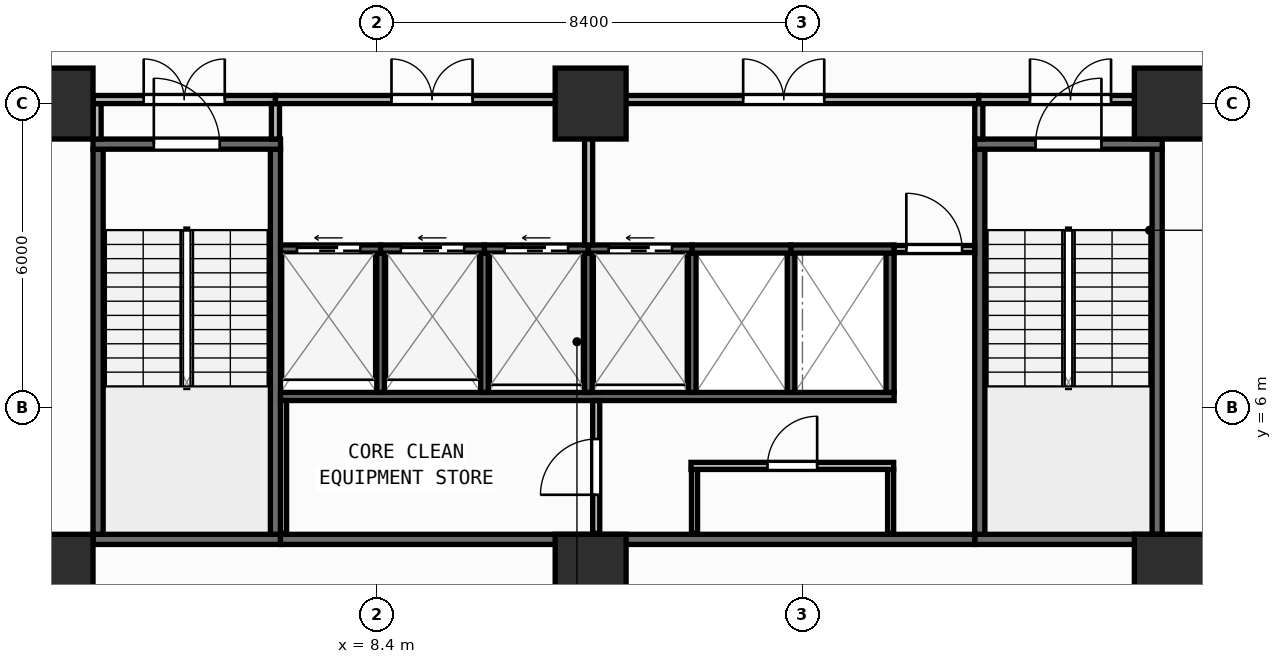
"""IFC4 building model, lengths in metres.
Left out: names, types, materials, properties, quantities, classifications, styles, units other than length and angle.
Written with IfcOpenShell. Run it as: python <this file> out.ifc"""

import sys

from ifc_helpers import new_model, si_unit, direction, frame, frame_2d, origin, origin_2d, place, context, subcontext, project, spatial, rectangle, extrude, element, fill, save


model = new_model("IFC4")
c1 = context("Model", 3, precision=1e-05, world=origin(), true_north=direction((0.0, 1.0)))
c2 = subcontext(c1, "Body", "Model", "MODEL_VIEW")
j1 = project(units=[si_unit("LENGTHUNIT", "METRE"), si_unit("PLANEANGLEUNIT", "RADIAN")], contexts=[c1])
p1 = place(None, origin())
s1 = spatial("IfcSite", under=j1, at=p1, CompositionType="ELEMENT")
p2 = place(p1, origin())
s2 = spatial("IfcBuilding", under=s1, at=p2, CompositionType="ELEMENT")
p3 = place(p2, frame((0.0, 0.0, 18.0)))
s3 = spatial("IfcBuildingStorey", under=s2, at=p3, CompositionType="ELEMENT", Elevation=18.0)
for number, where, z_axis, x_axis in (
    (1, (2.1, 2.8, 0.0), (0.0, 0.0, 1.0), (1.0, 0.0, 0.0)),
    (2, (12.62, 2.8, 0.0), (0.0, 0.0, 1.0), (1.0, 0.0, 0.0)),
    (3, (24.05, 2.8, 0.0), (0.0, 0.0, 1.0), (1.0, 0.0, 0.0)),
    (4, (2.1, 12.0, 0.0), (0.0, 0.0, 1.0), (1.0, 0.0, 0.0)),
    (5, (12.62, 12.0, 0.0), (0.0, 0.0, 1.0), (1.0, 0.0, 0.0)),
    (6, (24.05, 12.0, 0.0), (0.0, 0.0, 1.0), (1.0, 0.0, 0.0)),
):
    element("IfcColumn", number, at=place(p3, frame(where, z_axis=z_axis, x_axis=x_axis)), inside=s3, PredefinedType="COLUMN", context=c2, shape_type="SweptSolid", body=[
        extrude(rectangle(XDim=1.4, YDim=1.4, at=origin_2d()), origin(), (0.0, 0.0, 1.0), 4.5),
    ])
p4 = place(p3, frame((2.8, 3.4, 0.0), z_axis=(0.0, 0.0, 1.0), x_axis=(1.0, 0.0, 0.0)))
e7 = element("IfcWall", 7, at=p4, inside=s3, PredefinedType="SHEAR", context=c2, shape_type="SweptSolid", body=[
    extrude(rectangle(XDim=3.7, YDim=0.2, at=frame_2d((1.85, 0.0))), origin(), (0.0, 0.0, 1.0), 4.08),
])
for number, where, z_axis, x_axis in (
    (8, (2.9, 3.5, 0.0), (0.0, 0.0, 1.0), (0.0, 1.0, 0.0)),
    (9, (6.4, 3.5, 0.0), (0.0, 0.0, 1.0), (0.0, 1.0, 0.0)),
):
    element("IfcWall", number, at=place(p3, frame(where, z_axis=z_axis, x_axis=x_axis)), inside=s3, PredefinedType="SHEAR", context=c2, shape_type="SweptSolid", body=[
        extrude(rectangle(XDim=7.6, YDim=0.2, at=frame_2d((3.8, 0.0))), origin(), (0.0, 0.0, 1.0), 4.08),
    ])
p5 = place(p3, frame((2.8, 11.2, 0.0), z_axis=(0.0, 0.0, 1.0), x_axis=(1.0, 0.0, 0.0)))
e10 = element("IfcWall", 10, at=p5, inside=s3, PredefinedType="SHEAR", context=c2, shape_type="SweptSolid", body=[
    extrude(rectangle(XDim=3.7, YDim=0.2, at=frame_2d((1.85, 0.0))), origin(), (0.0, 0.0, 1.0), 4.08),
])
p6 = place(p5, frame((1.2, 0.0, 0.0)))
e11 = element("IfcOpeningElement", 11, at=p6, cuts=e10, PredefinedType="OPENING", context=c2, shape_type="SweptSolid", body=[
    extrude(rectangle(XDim=1.3, YDim=2.15, at=frame_2d((0.65, 1.075))), frame((0.0, 0.11, 0.0), z_axis=(0.0, -1.0, 0.0), x_axis=(1.0, 0.0, 0.0)), (0.0, 0.0, 1.0), 0.22),
])
p7 = place(p3, frame((20.2, 3.4, 0.0), z_axis=(0.0, 0.0, 1.0), x_axis=(1.0, 0.0, 0.0)))
e12 = element("IfcWall", 12, at=p7, inside=s3, PredefinedType="SHEAR", context=c2, shape_type="SweptSolid", body=[
    extrude(rectangle(XDim=3.7, YDim=0.2, at=frame_2d((1.85, 0.0))), origin(), (0.0, 0.0, 1.0), 4.08),
])
for number, where, z_axis, x_axis in (
    (13, (20.3, 3.5, 0.0), (0.0, 0.0, 1.0), (0.0, 1.0, 0.0)),
    (14, (23.8, 3.5, 0.0), (0.0, 0.0, 1.0), (0.0, 1.0, 0.0)),
):
    element("IfcWall", number, at=place(p3, frame(where, z_axis=z_axis, x_axis=x_axis)), inside=s3, PredefinedType="SHEAR", context=c2, shape_type="SweptSolid", body=[
        extrude(rectangle(XDim=7.6, YDim=0.2, at=frame_2d((3.8, 0.0))), origin(), (0.0, 0.0, 1.0), 4.08),
    ])
p8 = place(p3, frame((20.2, 11.2, 0.0), z_axis=(0.0, 0.0, 1.0), x_axis=(1.0, 0.0, 0.0)))
e15 = element("IfcWall", 15, at=p8, inside=s3, PredefinedType="SHEAR", context=c2, shape_type="SweptSolid", body=[
    extrude(rectangle(XDim=3.7, YDim=0.2, at=frame_2d((1.85, 0.0))), origin(), (0.0, 0.0, 1.0), 4.08),
])
p9 = place(p8, frame((1.2, 0.0, 0.0)))
e16 = element("IfcOpeningElement", 16, at=p9, cuts=e15, PredefinedType="OPENING", context=c2, shape_type="SweptSolid", body=[
    extrude(rectangle(XDim=1.3, YDim=2.15, at=frame_2d((0.65, 1.075))), frame((0.0, 0.11, 0.0), z_axis=(0.0, -1.0, 0.0), x_axis=(1.0, 0.0, 0.0)), (0.0, 0.0, 1.0), 0.22),
])
p10 = place(p3, frame((6.5, 3.4, 0.0), z_axis=(0.0, 0.0, 1.0), x_axis=(1.0, 0.0, 0.0)))
e17 = element("IfcWall", 17, at=p10, inside=s3, PredefinedType="SHEAR", context=c2, shape_type="SweptSolid", body=[
    extrude(rectangle(XDim=13.7, YDim=0.2, at=frame_2d((6.85, 0.0))), origin(), (0.0, 0.0, 1.0), 4.08),
])
p11 = place(p3, frame((6.5, 6.22, 0.0), z_axis=(0.0, 0.0, 1.0), x_axis=(1.0, 0.0, 0.0)))
e18 = element("IfcWall", 18, at=p11, inside=s3, PredefinedType="SHEAR", context=c2, shape_type="SweptSolid", body=[
    extrude(rectangle(XDim=12.11, YDim=0.16, at=frame_2d((6.055, 0.0))), origin(), (0.0, 0.0, 1.0), 4.08),
])
p12 = place(p3, frame((18.53, 6.3, 0.0), z_axis=(0.0, 0.0, 1.0), x_axis=(0.0, 1.0, 0.0)))
e19 = element("IfcWall", 19, at=p12, inside=s3, PredefinedType="SHEAR", context=c2, shape_type="SweptSolid", body=[
    extrude(rectangle(XDim=2.75, YDim=0.16, at=frame_2d((1.375, 0.0))), origin(), (0.0, 0.0, 1.0), 4.08),
])
for number, where, z_axis, x_axis in (
    (20, (8.475, 6.3, 0.0), (0.0, 0.0, 1.0), (0.0, 1.0, 0.0)),
    (21, (10.525, 6.3, 0.0), (0.0, 0.0, 1.0), (0.0, 1.0, 0.0)),
    (22, (12.575, 6.3, 0.0), (0.0, 0.0, 1.0), (0.0, 1.0, 0.0)),
    (23, (14.625, 6.3, 0.0), (0.0, 0.0, 1.0), (0.0, 1.0, 0.0)),
    (24, (16.575, 6.3, 0.0), (0.0, 0.0, 1.0), (0.0, 1.0, 0.0)),
):
    element("IfcWall", number, at=place(p3, frame(where, z_axis=z_axis, x_axis=x_axis)), inside=s3, PredefinedType="SHEAR", context=c2, shape_type="SweptSolid", body=[
        extrude(rectangle(XDim=2.75, YDim=0.15, at=frame_2d((1.375, 0.0))), origin(), (0.0, 0.0, 1.0), 4.08),
    ])
p13 = place(p3, frame((6.5, 9.13, 0.0), z_axis=(0.0, 0.0, 1.0), x_axis=(1.0, 0.0, 0.0)))
e25 = element("IfcWall", 25, at=p13, inside=s3, PredefinedType="SHEAR", context=c2, shape_type="SweptSolid", body=[
    extrude(rectangle(XDim=1.975, YDim=0.16, at=frame_2d((0.988, 0.0))), origin(), (0.0, 0.0, 1.0), 4.08),
])
p14 = place(p13, frame((0.325, 0.0, 0.0)))
e26 = element("IfcOpeningElement", 26, at=p14, cuts=e25, PredefinedType="OPENING", context=c2, shape_type="SweptSolid", body=[
    extrude(rectangle(XDim=1.25, YDim=2.15, at=frame_2d((0.625, 1.075))), frame((0.0, 0.09, 0.0), z_axis=(0.0, -1.0, 0.0), x_axis=(1.0, 0.0, 0.0)), (0.0, 0.0, 1.0), 0.18),
])
p15 = place(p3, frame((8.475, 9.13, 0.0), z_axis=(0.0, 0.0, 1.0), x_axis=(1.0, 0.0, 0.0)))
e27 = element("IfcWall", 27, at=p15, inside=s3, PredefinedType="SHEAR", context=c2, shape_type="SweptSolid", body=[
    extrude(rectangle(XDim=2.05, YDim=0.16, at=frame_2d((1.025, 0.0))), origin(), (0.0, 0.0, 1.0), 4.08),
])
p16 = place(p15, frame((0.4, 0.0, 0.0)))
e28 = element("IfcOpeningElement", 28, at=p16, cuts=e27, PredefinedType="OPENING", context=c2, shape_type="SweptSolid", body=[
    extrude(rectangle(XDim=1.25, YDim=2.15, at=frame_2d((0.625, 1.075))), frame((0.0, 0.09, 0.0), z_axis=(0.0, -1.0, 0.0), x_axis=(1.0, 0.0, 0.0)), (0.0, 0.0, 1.0), 0.18),
])
p17 = place(p3, frame((10.525, 9.13, 0.0), z_axis=(0.0, 0.0, 1.0), x_axis=(1.0, 0.0, 0.0)))
e29 = element("IfcWall", 29, at=p17, inside=s3, PredefinedType="SHEAR", context=c2, shape_type="SweptSolid", body=[
    extrude(rectangle(XDim=2.05, YDim=0.16, at=frame_2d((1.025, 0.0))), origin(), (0.0, 0.0, 1.0), 4.08),
])
p18 = place(p17, frame((0.4, 0.0, 0.0)))
e30 = element("IfcOpeningElement", 30, at=p18, cuts=e29, PredefinedType="OPENING", context=c2, shape_type="SweptSolid", body=[
    extrude(rectangle(XDim=1.25, YDim=2.15, at=frame_2d((0.625, 1.075))), frame((0.0, 0.09, 0.0), z_axis=(0.0, -1.0, 0.0), x_axis=(1.0, 0.0, 0.0)), (0.0, 0.0, 1.0), 0.18),
])
p19 = place(p3, frame((12.575, 9.13, 0.0), z_axis=(0.0, 0.0, 1.0), x_axis=(1.0, 0.0, 0.0)))
e31 = element("IfcWall", 31, at=p19, inside=s3, PredefinedType="SHEAR", context=c2, shape_type="SweptSolid", body=[
    extrude(rectangle(XDim=2.05, YDim=0.16, at=frame_2d((1.025, 0.0))), origin(), (0.0, 0.0, 1.0), 4.08),
])
p20 = place(p19, frame((0.4, 0.0, 0.0)))
e32 = element("IfcOpeningElement", 32, at=p20, cuts=e31, PredefinedType="OPENING", context=c2, shape_type="SweptSolid", body=[
    extrude(rectangle(XDim=1.25, YDim=2.15, at=frame_2d((0.625, 1.075))), frame((0.0, 0.09, 0.0), z_axis=(0.0, -1.0, 0.0), x_axis=(1.0, 0.0, 0.0)), (0.0, 0.0, 1.0), 0.18),
])
p21 = place(p3, frame((14.625, 9.13, 0.0), z_axis=(0.0, 0.0, 1.0), x_axis=(1.0, 0.0, 0.0)))
e33 = element("IfcWall", 33, at=p21, inside=s3, PredefinedType="SHEAR", context=c2, shape_type="SweptSolid", body=[
    extrude(rectangle(XDim=1.95, YDim=0.16, at=frame_2d((0.975, 0.0))), origin(), (0.0, 0.0, 1.0), 4.08),
])
p22 = place(p3, frame((16.575, 9.13, 0.0), z_axis=(0.0, 0.0, 1.0), x_axis=(1.0, 0.0, 0.0)))
e34 = element("IfcWall", 34, at=p22, inside=s3, PredefinedType="SHEAR", context=c2, shape_type="SweptSolid", body=[
    extrude(rectangle(XDim=2.035, YDim=0.16, at=frame_2d((1.018, 0.0))), origin(), (0.0, 0.0, 1.0), 4.08),
])
p23 = place(p3, frame((6.56, 3.52, 0.0), z_axis=(0.0, 0.0, 1.0), x_axis=(0.0, 1.0, 0.0)))
e35 = element("IfcWall", 35, at=p23, inside=s3, PredefinedType="PARTITIONING", context=c2, shape_type="SweptSolid", body=[
    extrude(rectangle(XDim=2.62, YDim=0.12, at=frame_2d((1.31, 0.0))), origin(), (0.0, 0.0, 1.0), 4.08),
])
p24 = place(p3, frame((12.73, 3.52, 0.0), z_axis=(0.0, 0.0, 1.0), x_axis=(0.0, 1.0, 0.0)))
e36 = element("IfcWall", 36, at=p24, inside=s3, PredefinedType="PARTITIONING", context=c2, shape_type="SweptSolid", body=[
    extrude(rectangle(XDim=2.62, YDim=0.14, at=frame_2d((1.31, 0.0))), origin(), (0.0, 0.0, 1.0), 4.08),
])
p25 = place(p24, frame((0.76, 0.0, 0.0)))
e37 = element("IfcOpeningElement", 37, at=p25, cuts=e36, PredefinedType="OPENING", context=c2, shape_type="SweptSolid", body=[
    extrude(rectangle(XDim=1.1, YDim=2.1, at=frame_2d((0.55, 1.05))), frame((0.0, 0.08, 0.0), z_axis=(0.0, -1.0, 0.0), x_axis=(1.0, 0.0, 0.0)), (0.0, 0.0, 1.0), 0.16),
])
for number, where, z_axis, x_axis in (
    (38, (14.67, 3.52, 0.0), (0.0, 0.0, 1.0), (0.0, 1.0, 0.0)),
    (39, (18.54, 3.52, 0.0), (0.0, 0.0, 1.0), (0.0, 1.0, 0.0)),
):
    element("IfcWall", number, at=place(p3, frame(where, z_axis=z_axis, x_axis=x_axis)), inside=s3, PredefinedType="PARTITIONING", context=c2, shape_type="SweptSolid", body=[
        extrude(rectangle(XDim=1.26, YDim=0.12, at=frame_2d((0.63, 0.0))), origin(), (0.0, 0.0, 1.0), 4.08),
    ])
p26 = place(p3, frame((14.6, 4.85, 0.0), z_axis=(0.0, 0.0, 1.0), x_axis=(1.0, 0.0, 0.0)))
e40 = element("IfcWall", 40, at=p26, inside=s3, PredefinedType="PARTITIONING", context=c2, shape_type="SweptSolid", body=[
    extrude(rectangle(XDim=4.0, YDim=0.14, at=frame_2d((2.0, 0.0))), origin(), (0.0, 0.0, 1.0), 4.08),
])
p27 = place(p26, frame((1.51, 0.0, 0.0)))
e41 = element("IfcOpeningElement", 41, at=p27, cuts=e40, PredefinedType="OPENING", context=c2, shape_type="SweptSolid", body=[
    extrude(rectangle(XDim=0.98, YDim=2.1, at=frame_2d((0.49, 1.05))), frame((0.0, 0.08, 0.0), z_axis=(0.0, -1.0, 0.0), x_axis=(1.0, 0.0, 0.0)), (0.0, 0.0, 1.0), 0.16),
])
p28 = place(p3, frame((18.61, 9.13, 0.0), z_axis=(0.0, 0.0, 1.0), x_axis=(1.0, 0.0, 0.0)))
e42 = element("IfcWall", 42, at=p28, inside=s3, PredefinedType="PARTITIONING", context=c2, shape_type="SweptSolid", body=[
    extrude(rectangle(XDim=1.59, YDim=0.14, at=frame_2d((0.795, 0.0))), origin(), (0.0, 0.0, 1.0), 4.08),
])
p29 = place(p28, frame((0.24, 0.0, 0.0)))
e43 = element("IfcOpeningElement", 43, at=p29, cuts=e42, PredefinedType="OPENING", context=c2, shape_type="SweptSolid", body=[
    extrude(rectangle(XDim=1.1, YDim=2.1, at=frame_2d((0.55, 1.05))), frame((0.0, 0.08, 0.0), z_axis=(0.0, -1.0, 0.0), x_axis=(1.0, 0.0, 0.0)), (0.0, 0.0, 1.0), 0.16),
])
p30 = place(p3, frame((2.88, 11.3, 0.0), z_axis=(0.0, 0.0, 1.0), x_axis=(0.0, 1.0, 0.0)))
e44 = element("IfcWall", 44, at=p30, inside=s3, PredefinedType="PARTITIONING", context=c2, shape_type="SweptSolid", body=[
    extrude(rectangle(XDim=0.7, YDim=0.16, at=frame_2d((0.35, 0.0))), origin(), (0.0, 0.0, 1.0), 4.08),
])
p31 = place(p3, frame((2.8, 12.08, 0.0), z_axis=(0.0, 0.0, 1.0), x_axis=(1.0, 0.0, 0.0)))
e45 = element("IfcWall", 45, at=p31, inside=s3, PredefinedType="PARTITIONING", context=c2, shape_type="SweptSolid", body=[
    extrude(rectangle(XDim=3.6, YDim=0.16, at=frame_2d((1.8, 0.0))), origin(), (0.0, 0.0, 1.0), 2.855),
])
p32 = place(p31, frame((1.0, 0.0, 0.0)))
e46 = element("IfcOpeningElement", 46, at=p32, cuts=e45, PredefinedType="OPENING", context=c2, shape_type="SweptSolid", body=[
    extrude(rectangle(XDim=1.6, YDim=2.05, at=frame_2d((0.8, 1.025))), frame((0.0, 0.09, 0.0), z_axis=(0.0, -1.0, 0.0), x_axis=(1.0, 0.0, 0.0)), (0.0, 0.0, 1.0), 0.18),
])
p33 = place(p3, frame((6.4, 11.3, 0.0), z_axis=(0.0, 0.0, 1.0), x_axis=(0.0, 1.0, 0.0)))
e47 = element("IfcWall", 47, at=p33, inside=s3, PredefinedType="PARTITIONING", context=c2, shape_type="SweptSolid", body=[
    extrude(rectangle(XDim=0.7, YDim=0.16, at=frame_2d((0.35, 0.0))), origin(), (0.0, 0.0, 1.0), 4.08),
])
p34 = place(p3, frame((6.4, 12.08, 0.0), z_axis=(0.0, 0.0, 1.0), x_axis=(1.0, 0.0, 0.0)))
e48 = element("IfcWall", 48, at=p34, inside=s3, PredefinedType="PARTITIONING", context=c2, shape_type="SweptSolid", body=[
    extrude(rectangle(XDim=6.18, YDim=0.16, at=frame_2d((3.09, 0.0))), origin(), (0.0, 0.0, 1.0), 2.855),
])
p35 = place(p34, frame((2.29, 0.0, 0.0)))
e49 = element("IfcOpeningElement", 49, at=p35, cuts=e48, PredefinedType="OPENING", context=c2, shape_type="SweptSolid", body=[
    extrude(rectangle(XDim=1.6, YDim=2.05, at=frame_2d((0.8, 1.025))), frame((0.0, 0.09, 0.0), z_axis=(0.0, -1.0, 0.0), x_axis=(1.0, 0.0, 0.0)), (0.0, 0.0, 1.0), 0.18),
])
p36 = place(p3, frame((12.58, 9.21, 0.0), z_axis=(0.0, 0.0, 1.0), x_axis=(0.0, 1.0, 0.0)))
e50 = element("IfcWall", 50, at=p36, inside=s3, PredefinedType="PARTITIONING", context=c2, shape_type="SweptSolid", body=[
    extrude(rectangle(XDim=2.79, YDim=0.16, at=frame_2d((1.395, 0.0))), origin(), (0.0, 0.0, 1.0), 4.08),
])
p37 = place(p3, frame((12.58, 12.08, 0.0), z_axis=(0.0, 0.0, 1.0), x_axis=(1.0, 0.0, 0.0)))
e51 = element("IfcWall", 51, at=p37, inside=s3, PredefinedType="PARTITIONING", context=c2, shape_type="SweptSolid", body=[
    extrude(rectangle(XDim=7.7, YDim=0.16, at=frame_2d((3.85, 0.0))), origin(), (0.0, 0.0, 1.0), 2.855),
])
p38 = place(p37, frame((3.05, 0.0, 0.0)))
e52 = element("IfcOpeningElement", 52, at=p38, cuts=e51, PredefinedType="OPENING", context=c2, shape_type="SweptSolid", body=[
    extrude(rectangle(XDim=1.6, YDim=2.05, at=frame_2d((0.8, 1.025))), frame((0.0, 0.09, 0.0), z_axis=(0.0, -1.0, 0.0), x_axis=(1.0, 0.0, 0.0)), (0.0, 0.0, 1.0), 0.18),
])
p39 = place(p3, frame((20.28, 11.3, 0.0), z_axis=(0.0, 0.0, 1.0), x_axis=(0.0, 1.0, 0.0)))
e53 = element("IfcWall", 53, at=p39, inside=s3, PredefinedType="PARTITIONING", context=c2, shape_type="SweptSolid", body=[
    extrude(rectangle(XDim=0.7, YDim=0.16, at=frame_2d((0.35, 0.0))), origin(), (0.0, 0.0, 1.0), 4.08),
])
p40 = place(p3, frame((20.28, 12.08, 0.0), z_axis=(0.0, 0.0, 1.0), x_axis=(1.0, 0.0, 0.0)))
e54 = element("IfcWall", 54, at=p40, inside=s3, PredefinedType="PARTITIONING", context=c2, shape_type="SweptSolid", body=[
    extrude(rectangle(XDim=3.62, YDim=0.16, at=frame_2d((1.81, 0.0))), origin(), (0.0, 0.0, 1.0), 2.855),
])
p41 = place(p40, frame((1.01, 0.0, 0.0)))
e55 = element("IfcOpeningElement", 55, at=p41, cuts=e54, PredefinedType="OPENING", context=c2, shape_type="SweptSolid", body=[
    extrude(rectangle(XDim=1.6, YDim=2.05, at=frame_2d((0.8, 1.025))), frame((0.0, 0.09, 0.0), z_axis=(0.0, -1.0, 0.0), x_axis=(1.0, 0.0, 0.0)), (0.0, 0.0, 1.0), 0.18),
])
p42 = place(p3, frame((23.82, 11.3, 0.0), z_axis=(0.0, 0.0, 1.0), x_axis=(0.0, 1.0, 0.0)))
e56 = element("IfcWall", 56, at=p42, inside=s3, PredefinedType="PARTITIONING", context=c2, shape_type="SweptSolid", body=[
    extrude(rectangle(XDim=0.7, YDim=0.16, at=frame_2d((0.35, 0.0))), origin(), (0.0, 0.0, 1.0), 4.08),
])
p43 = place(p3, frame((24.02, 12.08, 0.0), z_axis=(0.0, 0.0, 1.0), x_axis=(1.0, 0.0, 0.0)))
e57 = element("IfcWall", 57, at=p43, inside=s3, PredefinedType="PARTITIONING", context=c2, shape_type="SweptSolid", body=[
    extrude(rectangle(XDim=1.65, YDim=0.16, at=frame_2d((0.825, 0.0))), origin(), (0.0, 0.0, 1.0), 3.255),
])
p44 = place(p6, origin())
e58 = element("IfcDoor", 58, at=p44, inside=s3, OperationType="SINGLE_SWING_LEFT", PredefinedType="DOOR", context=c2, shape_type="SweptSolid", body=[
    extrude(rectangle(XDim=1.3, YDim=2.15, at=frame_2d((0.65, 1.075))), frame((0.0, 0.025, 0.0), z_axis=(0.0, -1.0, 0.0), x_axis=(1.0, 0.0, 0.0)), (0.0, 0.0, 1.0), 0.05),
])
fill(e11, e58)
p45 = place(p9, origin())
e59 = element("IfcDoor", 59, at=p45, inside=s3, OperationType="SINGLE_SWING_RIGHT", PredefinedType="DOOR", context=c2, shape_type="SweptSolid", body=[
    extrude(rectangle(XDim=1.3, YDim=2.15, at=frame_2d((0.65, 1.075))), frame((0.0, 0.025, 0.0), z_axis=(0.0, -1.0, 0.0), x_axis=(1.0, 0.0, 0.0)), (0.0, 0.0, 1.0), 0.05),
])
fill(e16, e59)
p46 = place(p14, origin())
e60 = element("IfcDoor", 60, at=p46, inside=s3, OperationType="SLIDING_TO_LEFT", PredefinedType="DOOR", context=c2, shape_type="SweptSolid", body=[
    extrude(rectangle(XDim=1.25, YDim=2.15, at=frame_2d((0.625, 1.075))), frame((0.0, 0.025, 0.0), z_axis=(0.0, -1.0, 0.0), x_axis=(1.0, 0.0, 0.0)), (0.0, 0.0, 1.0), 0.05),
])
fill(e26, e60)
p47 = place(p16, origin())
e61 = element("IfcDoor", 61, at=p47, inside=s3, OperationType="SLIDING_TO_LEFT", PredefinedType="DOOR", context=c2, shape_type="SweptSolid", body=[
    extrude(rectangle(XDim=1.25, YDim=2.15, at=frame_2d((0.625, 1.075))), frame((0.0, 0.025, 0.0), z_axis=(0.0, -1.0, 0.0), x_axis=(1.0, 0.0, 0.0)), (0.0, 0.0, 1.0), 0.05),
])
fill(e28, e61)
p48 = place(p18, origin())
e62 = element("IfcDoor", 62, at=p48, inside=s3, OperationType="SLIDING_TO_LEFT", PredefinedType="DOOR", context=c2, shape_type="SweptSolid", body=[
    extrude(rectangle(XDim=1.25, YDim=2.15, at=frame_2d((0.625, 1.075))), frame((0.0, 0.025, 0.0), z_axis=(0.0, -1.0, 0.0), x_axis=(1.0, 0.0, 0.0)), (0.0, 0.0, 1.0), 0.05),
])
fill(e30, e62)
p49 = place(p20, origin())
e63 = element("IfcDoor", 63, at=p49, inside=s3, OperationType="SLIDING_TO_LEFT", PredefinedType="DOOR", context=c2, shape_type="SweptSolid", body=[
    extrude(rectangle(XDim=1.25, YDim=2.15, at=frame_2d((0.625, 1.075))), frame((0.0, 0.025, 0.0), z_axis=(0.0, -1.0, 0.0), x_axis=(1.0, 0.0, 0.0)), (0.0, 0.0, 1.0), 0.05),
])
fill(e32, e63)
p50 = place(p25, origin())
e64 = element("IfcDoor", 64, at=p50, inside=s3, OperationType="SINGLE_SWING_LEFT", PredefinedType="DOOR", context=c2, shape_type="SweptSolid", body=[
    extrude(rectangle(XDim=1.1, YDim=2.1, at=frame_2d((0.55, 1.05))), frame((0.0, 0.025, 0.0), z_axis=(0.0, -1.0, 0.0), x_axis=(1.0, 0.0, 0.0)), (0.0, 0.0, 1.0), 0.05),
])
fill(e37, e64)
p51 = place(p27, origin())
e65 = element("IfcDoor", 65, at=p51, inside=s3, OperationType="SINGLE_SWING_RIGHT", PredefinedType="DOOR", context=c2, shape_type="SweptSolid", body=[
    extrude(rectangle(XDim=0.98, YDim=2.1, at=frame_2d((0.49, 1.05))), frame((0.0, 0.025, 0.0), z_axis=(0.0, -1.0, 0.0), x_axis=(1.0, 0.0, 0.0)), (0.0, 0.0, 1.0), 0.05),
])
fill(e41, e65)
p52 = place(p29, origin())
e66 = element("IfcDoor", 66, at=p52, inside=s3, OperationType="SINGLE_SWING_LEFT", PredefinedType="DOOR", context=c2, shape_type="SweptSolid", body=[
    extrude(rectangle(XDim=1.1, YDim=2.1, at=frame_2d((0.55, 1.05))), frame((0.0, 0.025, 0.0), z_axis=(0.0, -1.0, 0.0), x_axis=(1.0, 0.0, 0.0)), (0.0, 0.0, 1.0), 0.05),
])
fill(e43, e66)
p53 = place(p32, origin())
e67 = element("IfcDoor", 67, at=p53, inside=s3, OperationType="DOUBLE_DOOR_SINGLE_SWING", PredefinedType="DOOR", context=c2, shape_type="SweptSolid", body=[
    extrude(rectangle(XDim=1.6, YDim=2.05, at=frame_2d((0.8, 1.025))), frame((0.0, 0.025, 0.0), z_axis=(0.0, -1.0, 0.0), x_axis=(1.0, 0.0, 0.0)), (0.0, 0.0, 1.0), 0.05),
])
fill(e46, e67)
p54 = place(p35, origin())
e68 = element("IfcDoor", 68, at=p54, inside=s3, OperationType="DOUBLE_DOOR_SINGLE_SWING", PredefinedType="DOOR", context=c2, shape_type="SweptSolid", body=[
    extrude(rectangle(XDim=1.6, YDim=2.05, at=frame_2d((0.8, 1.025))), frame((0.0, 0.025, 0.0), z_axis=(0.0, -1.0, 0.0), x_axis=(1.0, 0.0, 0.0)), (0.0, 0.0, 1.0), 0.05),
])
fill(e49, e68)
p55 = place(p38, origin())
e69 = element("IfcDoor", 69, at=p55, inside=s3, OperationType="DOUBLE_DOOR_SINGLE_SWING", PredefinedType="DOOR", context=c2, shape_type="SweptSolid", body=[
    extrude(rectangle(XDim=1.6, YDim=2.05, at=frame_2d((0.8, 1.025))), frame((0.0, 0.025, 0.0), z_axis=(0.0, -1.0, 0.0), x_axis=(1.0, 0.0, 0.0)), (0.0, 0.0, 1.0), 0.05),
])
fill(e52, e69)
p56 = place(p41, origin())
e70 = element("IfcDoor", 70, at=p56, inside=s3, OperationType="DOUBLE_DOOR_SINGLE_SWING", PredefinedType="DOOR", context=c2, shape_type="SweptSolid", body=[
    extrude(rectangle(XDim=1.6, YDim=2.05, at=frame_2d((0.8, 1.025))), frame((0.0, 0.025, 0.0), z_axis=(0.0, -1.0, 0.0), x_axis=(1.0, 0.0, 0.0)), (0.0, 0.0, 1.0), 0.05),
])
fill(e55, e70)
save(model, sys.argv[1])
